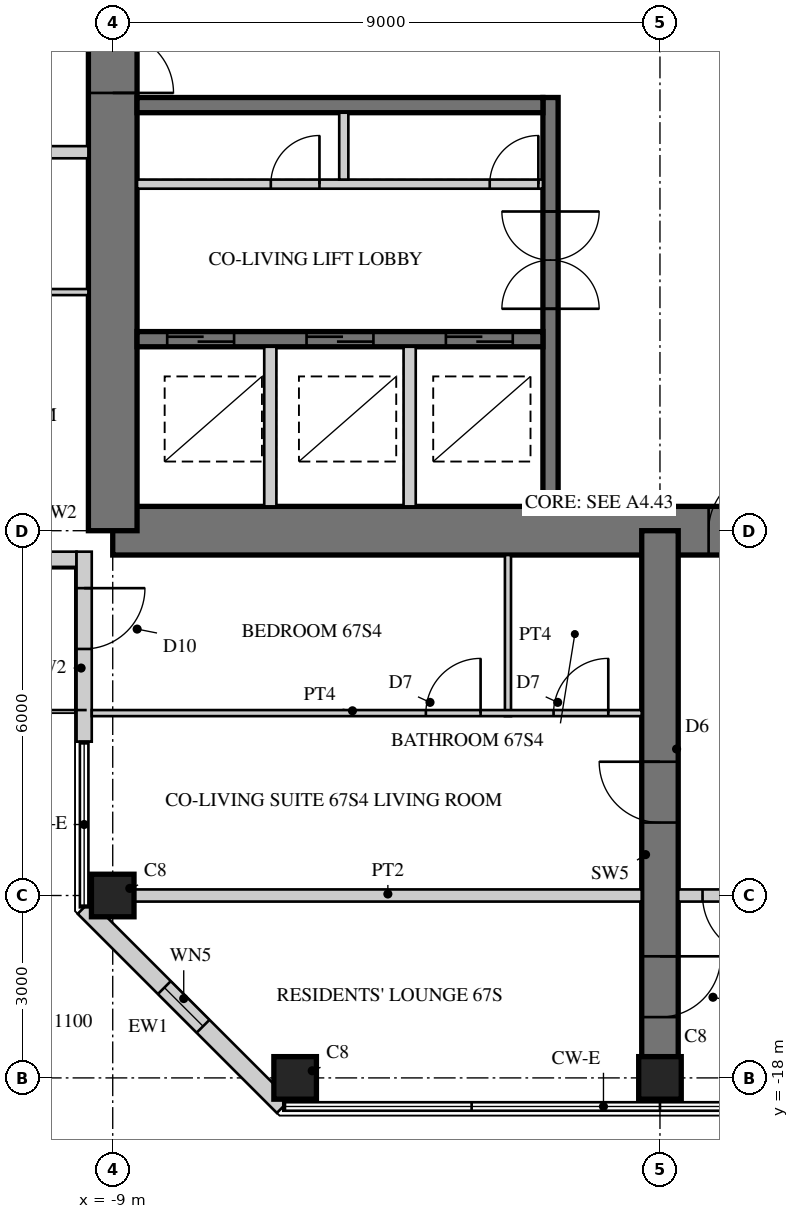
"""IFC4 building model, lengths in metres.
Left out: names, types, materials, properties, quantities, classifications, styles, units other than length and angle.
Written with IfcOpenShell. Run it as: python <this file> out.ifc"""

import sys

from ifc_helpers import new_model, si_unit, direction, frame, frame_2d, origin, origin_2d, place, context, subcontext, project, spatial, rectangle, hollow_rectangle, extrude, element, fill, save


model = new_model("IFC4")
c1 = context("Model", 3, precision=1e-05, world=origin(), true_north=direction((0.0, 1.0)))
c2 = subcontext(c1, "Body", "Model", "MODEL_VIEW")
j1 = project(units=[si_unit("LENGTHUNIT", "METRE"), si_unit("PLANEANGLEUNIT", "RADIAN")], contexts=[c1])
p1 = place(None, origin())
s1 = spatial("IfcSite", under=j1, at=p1, CompositionType="ELEMENT")
p2 = place(p1, origin())
s2 = spatial("IfcBuilding", under=s1, at=p2, CompositionType="ELEMENT")
p3 = place(p2, frame((0.0, 0.0, 261.1)))
s3 = spatial("IfcBuildingStorey", under=s2, at=p3, CompositionType="ELEMENT", Elevation=261.1)
p4 = place(p3, frame((-9.0, -9.0, 0.0), z_axis=(0.0, 0.0, 1.0), x_axis=(1.0, 0.0, 0.0)))
e1 = element("IfcWall", 1, at=p4, inside=s3, PredefinedType="SHEAR", context=c2, shape_type="SweptSolid", body=[
    extrude(rectangle(XDim=18.0, YDim=0.8, at=frame_2d((9.0, 0.0))), origin(), (0.0, 0.0, 1.0), 3.4),
])
p5 = place(p4, frame((9.8, 0.0, 0.0)))
e2 = element("IfcOpeningElement", 2, at=p5, cuts=e1, PredefinedType="OPENING", context=c2, shape_type="SweptSolid", body=[
    extrude(rectangle(XDim=1.0, YDim=2.4, at=frame_2d((0.5, 1.2))), frame((0.0, 0.41, 0.0), z_axis=(0.0, -1.0, 0.0), x_axis=(1.0, 0.0, 0.0)), (0.0, 0.0, 1.0), 0.82),
])
p6 = place(p3, frame((-9.0, 9.0, 0.0), z_axis=(0.0, 0.0, 1.0), x_axis=(0.0, -1.0, 0.0)))
e3 = element("IfcWall", 3, at=p6, inside=s3, PredefinedType="SHEAR", context=c2, shape_type="SweptSolid", body=[
    extrude(rectangle(XDim=18.0, YDim=0.8, at=frame_2d((9.0, 0.0))), origin(), (0.0, 0.0, 1.0), 3.4),
])
p7 = place(p6, frame((9.8, 0.0, 0.0)))
e4 = element("IfcOpeningElement", 4, at=p7, cuts=e3, PredefinedType="OPENING", context=c2, shape_type="SweptSolid", body=[
    extrude(rectangle(XDim=1.0, YDim=2.4, at=frame_2d((0.5, 1.2))), frame((0.0, 0.41, 0.0), z_axis=(0.0, -1.0, 0.0), x_axis=(1.0, 0.0, 0.0)), (0.0, 0.0, 1.0), 0.82),
])
p8 = place(p3, frame((-1.8, -1.875, 0.0), z_axis=(0.0, 0.0, 1.0), x_axis=(0.0, -1.0, 0.0)))
e5 = element("IfcWall", 5, at=p8, inside=s3, PredefinedType="SHEAR", context=c2, shape_type="SweptSolid", body=[
    extrude(rectangle(XDim=6.725, YDim=0.25, at=frame_2d((3.363, 0.0))), origin(), (0.0, 0.0, 1.0), 3.4),
])
p9 = place(p8, frame((1.875, 0.0, 0.0)))
e6 = element("IfcOpeningElement", 6, at=p9, cuts=e5, PredefinedType="OPENING", context=c2, shape_type="SweptSolid", body=[
    extrude(rectangle(XDim=1.6, YDim=2.4, at=frame_2d((0.8, 1.2))), frame((0.0, 0.135, 0.0), z_axis=(0.0, -1.0, 0.0), x_axis=(1.0, 0.0, 0.0)), (0.0, 0.0, 1.0), 0.27),
])
p10 = place(p3, frame((-1.925, -2.0, 0.0), z_axis=(0.0, 0.0, 1.0), x_axis=(-1.0, 0.0, 0.0)))
e7 = element("IfcWall", 7, at=p10, inside=s3, PredefinedType="SHEAR", context=c2, shape_type="SweptSolid", body=[
    extrude(rectangle(XDim=6.675, YDim=0.25, at=frame_2d((3.337, 0.0))), origin(), (0.0, 0.0, 1.0), 3.4),
])
p11 = place(p3, frame((-1.925, -5.85, 0.0), z_axis=(0.0, 0.0, 1.0), x_axis=(-1.0, 0.0, 0.0)))
e8 = element("IfcWall", 8, at=p11, inside=s3, PredefinedType="SHEAR", context=c2, shape_type="SweptSolid", body=[
    extrude(rectangle(XDim=6.675, YDim=0.25, at=frame_2d((3.337, 0.0))), origin(), (0.0, 0.0, 1.0), 3.4),
])
p12 = place(p11, frame((0.496, 0.0, 0.0)))
e9 = element("IfcOpeningElement", 9, at=p12, cuts=e8, PredefinedType="OPENING", context=c2, shape_type="SweptSolid", body=[
    extrude(rectangle(XDim=1.1, YDim=2.2, at=frame_2d((0.55, 1.1))), frame((0.0, 0.135, 0.0), z_axis=(0.0, -1.0, 0.0), x_axis=(1.0, 0.0, 0.0)), (0.0, 0.0, 1.0), 0.27),
])
p13 = place(p11, frame((2.788, 0.0, 0.0)))
e10 = element("IfcOpeningElement", 10, at=p13, cuts=e8, PredefinedType="OPENING", context=c2, shape_type="SweptSolid", body=[
    extrude(rectangle(XDim=1.1, YDim=2.2, at=frame_2d((0.55, 1.1))), frame((0.0, 0.135, 0.0), z_axis=(0.0, -1.0, 0.0), x_axis=(1.0, 0.0, 0.0)), (0.0, 0.0, 1.0), 0.27),
])
p14 = place(p11, frame((5.079, 0.0, 0.0)))
e11 = element("IfcOpeningElement", 11, at=p14, cuts=e8, PredefinedType="OPENING", context=c2, shape_type="SweptSolid", body=[
    extrude(rectangle(XDim=1.1, YDim=2.2, at=frame_2d((0.55, 1.1))), frame((0.0, 0.135, 0.0), z_axis=(0.0, -1.0, 0.0), x_axis=(1.0, 0.0, 0.0)), (0.0, 0.0, 1.0), 0.27),
])
p15 = place(p3, frame((-1.925, -3.3, 0.0), z_axis=(0.0, 0.0, 1.0), x_axis=(-1.0, 0.0, 0.0)))
e12 = element("IfcWall", 12, at=p15, inside=s3, PredefinedType="PARTITIONING", context=c2, shape_type="SweptSolid", body=[
    extrude(rectangle(XDim=6.675, YDim=0.15, at=frame_2d((3.337, 0.0))), origin(), (0.0, 0.0, 1.0), 3.4),
])
p16 = place(p15, frame((0.075, 0.0, 0.0)))
e13 = element("IfcOpeningElement", 13, at=p16, cuts=e12, PredefinedType="OPENING", context=c2, shape_type="SweptSolid", body=[
    extrude(rectangle(XDim=0.8, YDim=2.1, at=frame_2d((0.4, 1.05))), frame((0.0, 0.085, 0.0), z_axis=(0.0, -1.0, 0.0), x_axis=(1.0, 0.0, 0.0)), (0.0, 0.0, 1.0), 0.17),
])
p17 = place(p15, frame((3.675, 0.0, 0.0)))
e14 = element("IfcOpeningElement", 14, at=p17, cuts=e12, PredefinedType="OPENING", context=c2, shape_type="SweptSolid", body=[
    extrude(rectangle(XDim=0.8, YDim=2.1, at=frame_2d((0.4, 1.05))), frame((0.0, 0.085, 0.0), z_axis=(0.0, -1.0, 0.0), x_axis=(1.0, 0.0, 0.0)), (0.0, 0.0, 1.0), 0.17),
])
p18 = place(p3, frame((-5.2, -2.125, 0.0), z_axis=(0.0, 0.0, 1.0), x_axis=(0.0, -1.0, 0.0)))
e15 = element("IfcWall", 15, at=p18, inside=s3, PredefinedType="PARTITIONING", context=c2, shape_type="SweptSolid", body=[
    extrude(rectangle(XDim=1.1, YDim=0.15, at=frame_2d((0.55, 0.0))), origin(), (0.0, 0.0, 1.0), 3.4),
])
for number, where, z_axis, x_axis in (
    (16, (-4.117, -5.975, 0.0), (0.0, 0.0, 1.0), (0.0, -1.0, 0.0)),
    (17, (-6.408, -5.975, 0.0), (0.0, 0.0, 1.0), (0.0, -1.0, 0.0)),
):
    element("IfcWall", number, at=place(p3, frame(where, z_axis=z_axis, x_axis=x_axis)), inside=s3, PredefinedType="PARTITIONING", context=c2, shape_type="SweptSolid", body=[
        extrude(rectangle(XDim=2.625, YDim=0.2, at=frame_2d((1.312, 0.0))), origin(), (0.0, 0.0, 1.0), 3.4),
    ])
p19 = place(p3, frame((0.0, -9.0, 0.0), z_axis=(0.0, 0.0, 1.0), x_axis=(0.0, -1.0, 0.0)))
e18 = element("IfcWall", 18, at=p19, inside=s3, PredefinedType="SHEAR", context=c2, shape_type="SweptSolid", body=[
    extrude(rectangle(XDim=9.0, YDim=0.6, at=frame_2d((4.5, 0.0))), origin(), (0.0, 0.0, 1.0), 3.4),
])
p20 = place(p19, frame((3.8, 0.0, 0.0)))
e19 = element("IfcOpeningElement", 19, at=p20, cuts=e18, PredefinedType="OPENING", context=c2, shape_type="SweptSolid", body=[
    extrude(rectangle(XDim=1.0, YDim=2.15, at=frame_2d((0.5, 1.075))), frame((0.0, 0.31, 0.0), z_axis=(0.0, -1.0, 0.0), x_axis=(1.0, 0.0, 0.0)), (0.0, 0.0, 1.0), 0.62),
])
p21 = place(p19, frame((7.0, 0.0, 0.0)))
e20 = element("IfcOpeningElement", 20, at=p21, cuts=e18, PredefinedType="OPENING", context=c2, shape_type="SweptSolid", body=[
    extrude(rectangle(XDim=1.0, YDim=2.2, at=frame_2d((0.5, 1.1))), frame((0.0, 0.31, 0.0), z_axis=(0.0, -1.0, 0.0), x_axis=(1.0, 0.0, 0.0)), (0.0, 0.0, 1.0), 0.62),
])
for number, where, z_axis, x_axis in (
    (21, (-9.0, -15.0, 0.0), (0.0, 0.0, 1.0), (1.0, 0.0, 0.0)),
    (22, (-6.0, -18.0, 0.0), (0.0, 0.0, 1.0), (1.0, 0.0, 0.0)),
    (23, (0.0, -18.0, 0.0), (0.0, 0.0, 1.0), (1.0, 0.0, 0.0)),
):
    element("IfcColumn", number, at=place(p3, frame(where, z_axis=z_axis, x_axis=x_axis)), inside=s3, PredefinedType="COLUMN", context=c2, shape_type="SweptSolid", body=[
        extrude(rectangle(XDim=0.7, YDim=0.7, at=origin_2d()), origin(), (0.0, 0.0, 1.0), 3.4),
    ])
p22 = place(p3, frame((-12.47, -9.47, 0.0), z_axis=(0.0, 0.0, 1.0), x_axis=(1.0, 0.0, 0.0)))
e24 = element("IfcWall", 24, at=p22, inside=s3, PredefinedType="SOLIDWALL", context=c2, shape_type="SweptSolid", body=[
    extrude(rectangle(XDim=2.875, YDim=0.25, at=frame_2d((1.438, 0.0))), origin(), (0.0, 0.0, 1.0), 3.22),
])
p23 = place(p22, frame((0.6, 0.0, 0.0)))
e25 = element("IfcOpeningElement", 25, at=p23, cuts=e24, PredefinedType="OPENING", context=c2, shape_type="SweptSolid", body=[
    extrude(rectangle(XDim=1.0, YDim=2.2, at=frame_2d((0.5, 1.1))), frame((0.0, 0.135, 0.0), z_axis=(0.0, -1.0, 0.0), x_axis=(1.0, 0.0, 0.0)), (0.0, 0.0, 1.0), 0.27),
])
p24 = place(p3, frame((-9.47, -9.345, 0.0), z_axis=(0.0, 0.0, 1.0), x_axis=(0.0, -1.0, 0.0)))
e26 = element("IfcWall", 26, at=p24, inside=s3, PredefinedType="SOLIDWALL", context=c2, shape_type="SweptSolid", body=[
    extrude(rectangle(XDim=3.125, YDim=0.25, at=frame_2d((1.562, 0.0))), origin(), (0.0, 0.0, 1.0), 3.22),
])
p25 = place(p24, frame((0.6, 0.0, 0.0)))
e27 = element("IfcOpeningElement", 27, at=p25, cuts=e26, PredefinedType="OPENING", context=c2, shape_type="SweptSolid", body=[
    extrude(rectangle(XDim=1.0, YDim=2.2, at=frame_2d((0.5, 1.1))), frame((0.0, 0.135, 0.0), z_axis=(0.0, -1.0, 0.0), x_axis=(1.0, 0.0, 0.0)), (0.0, 0.0, 1.0), 0.27),
])
p26 = place(p3, frame((-9.47, -15.195, 0.0), z_axis=(0.0, 0.0, 1.0), x_axis=(0.707106781187, -0.707106781187, 0.0)))
e28 = element("IfcWall", 28, at=p26, inside=s3, PredefinedType="SOLIDWALL", context=c2, shape_type="SweptSolid", body=[
    extrude(rectangle(XDim=4.632, YDim=0.3, at=frame_2d((2.316, 0.0))), origin(), (0.0, 0.0, 1.0), 3.22),
])
p27 = place(p26, frame((1.866, 0.0, 0.3)))
e29 = element("IfcOpeningElement", 29, at=p27, cuts=e28, PredefinedType="OPENING", context=c2, shape_type="SweptSolid", body=[
    extrude(rectangle(XDim=0.9, YDim=2.4, at=frame_2d((0.45, 1.2))), frame((0.0, 0.16, 0.0), z_axis=(0.0, -1.0, 0.0), x_axis=(1.0, 0.0, 0.0)), (0.0, 0.0, 1.0), 0.32),
])
p28 = place(p3, frame((-2.5, -9.4, 0.0), z_axis=(0.0, 0.0, 1.0), x_axis=(0.0, -1.0, 0.0)))
e30 = element("IfcWall", 30, at=p28, inside=s3, PredefinedType="PARTITIONING", context=c2, shape_type="SweptSolid", body=[
    extrude(rectangle(XDim=2.65, YDim=0.1, at=frame_2d((1.325, 0.0))), origin(), (0.0, 0.0, 1.0), 3.22),
])
p29 = place(p3, frame((-9.345, -12.0, 0.0), z_axis=(0.0, 0.0, 1.0), x_axis=(1.0, 0.0, 0.0)))
e31 = element("IfcWall", 31, at=p29, inside=s3, PredefinedType="PARTITIONING", context=c2, shape_type="SweptSolid", body=[
    extrude(rectangle(XDim=9.045, YDim=0.1, at=frame_2d((4.522, 0.0))), origin(), (0.0, 0.0, 1.0), 3.22),
])
p30 = place(p29, frame((5.495, 0.0, 0.0)))
e32 = element("IfcOpeningElement", 32, at=p30, cuts=e31, PredefinedType="OPENING", context=c2, shape_type="SweptSolid", body=[
    extrude(rectangle(XDim=0.9, YDim=2.1, at=frame_2d((0.45, 1.05))), frame((0.0, 0.06, 0.0), z_axis=(0.0, -1.0, 0.0), x_axis=(1.0, 0.0, 0.0)), (0.0, 0.0, 1.0), 0.12),
])
p31 = place(p29, frame((7.595, 0.0, 0.0)))
e33 = element("IfcOpeningElement", 33, at=p31, cuts=e31, PredefinedType="OPENING", context=c2, shape_type="SweptSolid", body=[
    extrude(rectangle(XDim=0.9, YDim=2.1, at=frame_2d((0.45, 1.05))), frame((0.0, 0.06, 0.0), z_axis=(0.0, -1.0, 0.0), x_axis=(1.0, 0.0, 0.0)), (0.0, 0.0, 1.0), 0.12),
])
p32 = place(p3, frame((-8.65, -15.0, 0.0), z_axis=(0.0, 0.0, 1.0), x_axis=(1.0, 0.0, 0.0)))
e34 = element("IfcWall", 34, at=p32, inside=s3, PredefinedType="SOLIDWALL", context=c2, shape_type="SweptSolid", body=[
    extrude(rectangle(XDim=8.35, YDim=0.2, at=frame_2d((4.175, 0.0))), origin(), (0.0, 0.0, 1.0), 2.52),
])
p33 = place(p3, frame((0.3, -15.0, 0.0), z_axis=(0.0, 0.0, 1.0), x_axis=(1.0, 0.0, 0.0)))
e35 = element("IfcWall", 35, at=p33, inside=s3, PredefinedType="SOLIDWALL", context=c2, shape_type="SweptSolid", body=[
    extrude(rectangle(XDim=8.35, YDim=0.2, at=frame_2d((4.175, 0.0))), origin(), (0.0, 0.0, 1.0), 2.52),
])
p34 = place(p33, frame((0.4, 0.0, 0.0)))
e36 = element("IfcOpeningElement", 36, at=p34, cuts=e35, PredefinedType="OPENING", context=c2, shape_type="SweptSolid", body=[
    extrude(rectangle(XDim=1.0, YDim=2.2, at=frame_2d((0.5, 1.1))), frame((0.0, 0.11, 0.0), z_axis=(0.0, -1.0, 0.0), x_axis=(1.0, 0.0, 0.0)), (0.0, 0.0, 1.0), 0.22),
])
p35 = place(p3, frame((-9.4, -5.075, 0.0), z_axis=(0.0, 0.0, 1.0), x_axis=(-1.0, 0.0, 0.0)))
e37 = element("IfcWall", 37, at=p35, inside=s3, PredefinedType="PARTITIONING", context=c2, shape_type="SweptSolid", body=[
    extrude(rectangle(XDim=3.25, YDim=0.1, at=frame_2d((1.625, 0.0))), origin(), (0.0, 0.0, 1.0), 3.22),
])
p36 = place(p3, frame((-9.4, -2.775, 0.0), z_axis=(0.0, 0.0, 1.0), x_axis=(-1.0, 0.0, 0.0)))
e38 = element("IfcWall", 38, at=p36, inside=s3, PredefinedType="SOLIDWALL", context=c2, shape_type="SweptSolid", body=[
    extrude(rectangle(XDim=5.6, YDim=0.2, at=frame_2d((2.8, 0.0))), origin(), (0.0, 0.0, 1.0), 3.22),
])
p37 = place(p36, frame((3.75, 0.0, 0.0)))
e39 = element("IfcOpeningElement", 39, at=p37, cuts=e38, PredefinedType="OPENING", context=c2, shape_type="SweptSolid", body=[
    extrude(rectangle(XDim=1.0, YDim=2.15, at=frame_2d((0.5, 1.075))), frame((0.0, 0.11, 0.0), z_axis=(0.0, -1.0, 0.0), x_axis=(1.0, 0.0, 0.0)), (0.0, 0.0, 1.0), 0.22),
])
p38 = place(p25, origin())
e40 = element("IfcDoor", 40, at=p38, inside=s3, OperationType="SINGLE_SWING_LEFT", PredefinedType="DOOR", context=c2, shape_type="SweptSolid", body=[
    extrude(hollow_rectangle(XDim=1.0, YDim=2.2, WallThickness=0.06, at=frame_2d((0.5, 1.1))), frame((0.0, 0.025, 0.0), z_axis=(0.0, -1.0, 0.0), x_axis=(1.0, 0.0, 0.0)), (0.0, 0.0, 1.0), 0.05),
    extrude(rectangle(XDim=0.879, YDim=2.079, at=frame_2d((0.5, 1.1))), frame((0.0, 0.025, 0.0), z_axis=(0.0, -1.0, 0.0), x_axis=(1.0, 0.0, 0.0)), (0.0, 0.0, 1.0), 0.05),
])
fill(e27, e40)
p39 = place(p27, origin())
e41 = element("IfcWindow", 41, at=p39, inside=s3, PartitioningType="SINGLE_PANEL", PredefinedType="WINDOW", context=c2, shape_type="SweptSolid", body=[
    extrude(hollow_rectangle(XDim=0.9, YDim=2.4, WallThickness=0.06, at=frame_2d((0.45, 1.2))), frame((0.0, 0.03, 0.0), z_axis=(0.0, -1.0, 0.0), x_axis=(1.0, 0.0, 0.0)), (0.0, 0.0, 1.0), 0.06),
    extrude(rectangle(XDim=0.779, YDim=2.279, at=frame_2d((0.45, 1.2))), frame((0.0, 0.03, 0.0), z_axis=(0.0, -1.0, 0.0), x_axis=(1.0, 0.0, 0.0)), (0.0, 0.0, 1.0), 0.06),
])
fill(e29, e41)
p40 = place(p30, origin())
e42 = element("IfcDoor", 42, at=p40, inside=s3, OperationType="SINGLE_SWING_RIGHT", PredefinedType="DOOR", context=c2, shape_type="SweptSolid", body=[
    extrude(rectangle(XDim=0.9, YDim=2.1, at=frame_2d((0.45, 1.05))), frame((0.0, 0.025, 0.0), z_axis=(0.0, -1.0, 0.0), x_axis=(1.0, 0.0, 0.0)), (0.0, 0.0, 1.0), 0.05),
])
fill(e32, e42)
p41 = place(p31, origin())
e43 = element("IfcDoor", 43, at=p41, inside=s3, OperationType="SINGLE_SWING_RIGHT", PredefinedType="DOOR", context=c2, shape_type="SweptSolid", body=[
    extrude(rectangle(XDim=0.9, YDim=2.1, at=frame_2d((0.45, 1.05))), frame((0.0, 0.025, 0.0), z_axis=(0.0, -1.0, 0.0), x_axis=(1.0, 0.0, 0.0)), (0.0, 0.0, 1.0), 0.05),
])
fill(e33, e43)
p42 = place(p34, frame((1.0, 0.0, 0.0), z_axis=(0.0, 0.0, 1.0), x_axis=(-1.0, 0.0, 0.0)))
e44 = element("IfcDoor", 44, at=p42, inside=s3, OperationType="SINGLE_SWING_LEFT", PredefinedType="DOOR", context=c2, shape_type="SweptSolid", body=[
    extrude(rectangle(XDim=1.0, YDim=2.2, at=frame_2d((0.5, 1.1))), frame((0.0, 0.025, 0.0), z_axis=(0.0, -1.0, 0.0), x_axis=(1.0, 0.0, 0.0)), (0.0, 0.0, 1.0), 0.05),
])
fill(e36, e44)
p43 = place(p20, frame((1.0, 0.0, 0.0), z_axis=(0.0, 0.0, 1.0), x_axis=(-1.0, 0.0, 0.0)))
e45 = element("IfcDoor", 45, at=p43, inside=s3, OperationType="SINGLE_SWING_RIGHT", PredefinedType="DOOR", context=c2, shape_type="SweptSolid", body=[
    extrude(rectangle(XDim=1.0, YDim=2.15, at=frame_2d((0.5, 1.075))), frame((0.0, 0.025, 0.0), z_axis=(0.0, -1.0, 0.0), x_axis=(1.0, 0.0, 0.0)), (0.0, 0.0, 1.0), 0.05),
])
fill(e19, e45)
p44 = place(p21, origin())
e46 = element("IfcDoor", 46, at=p44, inside=s3, OperationType="SINGLE_SWING_LEFT", PredefinedType="DOOR", context=c2, shape_type="SweptSolid", body=[
    extrude(rectangle(XDim=1.0, YDim=2.2, at=frame_2d((0.5, 1.1))), frame((0.0, 0.025, 0.0), z_axis=(0.0, -1.0, 0.0), x_axis=(1.0, 0.0, 0.0)), (0.0, 0.0, 1.0), 0.05),
])
fill(e20, e46)
p45 = place(p5, origin())
e47 = element("IfcDoor", 47, at=p45, inside=s3, OperationType="SINGLE_SWING_RIGHT", PredefinedType="DOOR", context=c2, shape_type="SweptSolid", body=[
    extrude(rectangle(XDim=1.0, YDim=2.4, at=frame_2d((0.5, 1.2))), frame((0.0, 0.055, 0.0), z_axis=(0.0, -1.0, 0.0), x_axis=(1.0, 0.0, 0.0)), (0.0, 0.0, 1.0), 0.05),
])
fill(e2, e47)
p46 = place(p7, origin())
e48 = element("IfcDoor", 48, at=p46, inside=s3, OperationType="SINGLE_SWING_RIGHT", PredefinedType="DOOR", context=c2, shape_type="SweptSolid", body=[
    extrude(rectangle(XDim=1.0, YDim=2.4, at=frame_2d((0.5, 1.2))), frame((0.0, 0.055, 0.0), z_axis=(0.0, -1.0, 0.0), x_axis=(1.0, 0.0, 0.0)), (0.0, 0.0, 1.0), 0.05),
])
fill(e4, e48)
p47 = place(p12, origin())
e49 = element("IfcDoor", 49, at=p47, inside=s3, OperationType="DOUBLE_DOOR_SLIDING", PredefinedType="DOOR", context=c2, shape_type="SweptSolid", body=[
    extrude(rectangle(XDim=1.1, YDim=2.2, at=frame_2d((0.55, 1.1))), frame((0.0, 0.025, 0.0), z_axis=(0.0, -1.0, 0.0), x_axis=(1.0, 0.0, 0.0)), (0.0, 0.0, 1.0), 0.05),
])
fill(e9, e49)
p48 = place(p13, origin())
e50 = element("IfcDoor", 50, at=p48, inside=s3, OperationType="DOUBLE_DOOR_SLIDING", PredefinedType="DOOR", context=c2, shape_type="SweptSolid", body=[
    extrude(rectangle(XDim=1.1, YDim=2.2, at=frame_2d((0.55, 1.1))), frame((0.0, 0.025, 0.0), z_axis=(0.0, -1.0, 0.0), x_axis=(1.0, 0.0, 0.0)), (0.0, 0.0, 1.0), 0.05),
])
fill(e10, e50)
p49 = place(p14, origin())
e51 = element("IfcDoor", 51, at=p49, inside=s3, OperationType="DOUBLE_DOOR_SLIDING", PredefinedType="DOOR", context=c2, shape_type="SweptSolid", body=[
    extrude(rectangle(XDim=1.1, YDim=2.2, at=frame_2d((0.55, 1.1))), frame((0.0, 0.025, 0.0), z_axis=(0.0, -1.0, 0.0), x_axis=(1.0, 0.0, 0.0)), (0.0, 0.0, 1.0), 0.05),
])
fill(e11, e51)
p50 = place(p9, origin())
e52 = element("IfcDoor", 52, at=p50, inside=s3, OperationType="DOUBLE_DOOR_DOUBLE_SWING", PredefinedType="DOOR", context=c2, shape_type="SweptSolid", body=[
    extrude(rectangle(XDim=1.6, YDim=2.4, at=frame_2d((0.8, 1.2))), frame((0.0, 0.025, 0.0), z_axis=(0.0, -1.0, 0.0), x_axis=(1.0, 0.0, 0.0)), (0.0, 0.0, 1.0), 0.05),
])
fill(e6, e52)
p51 = place(p16, frame((0.8, 0.0, 0.0), z_axis=(0.0, 0.0, 1.0), x_axis=(-1.0, 0.0, 0.0)))
e53 = element("IfcDoor", 53, at=p51, inside=s3, OperationType="SINGLE_SWING_RIGHT", PredefinedType="DOOR", context=c2, shape_type="SweptSolid", body=[
    extrude(rectangle(XDim=0.8, YDim=2.1, at=frame_2d((0.4, 1.05))), frame((0.0, 0.025, 0.0), z_axis=(0.0, -1.0, 0.0), x_axis=(1.0, 0.0, 0.0)), (0.0, 0.0, 1.0), 0.05),
])
fill(e13, e53)
p52 = place(p17, frame((0.8, 0.0, 0.0), z_axis=(0.0, 0.0, 1.0), x_axis=(-1.0, 0.0, 0.0)))
e54 = element("IfcDoor", 54, at=p52, inside=s3, OperationType="SINGLE_SWING_RIGHT", PredefinedType="DOOR", context=c2, shape_type="SweptSolid", body=[
    extrude(rectangle(XDim=0.8, YDim=2.1, at=frame_2d((0.4, 1.05))), frame((0.0, 0.025, 0.0), z_axis=(0.0, -1.0, 0.0), x_axis=(1.0, 0.0, 0.0)), (0.0, 0.0, 1.0), 0.05),
])
fill(e14, e54)
save(model, sys.argv[1])
